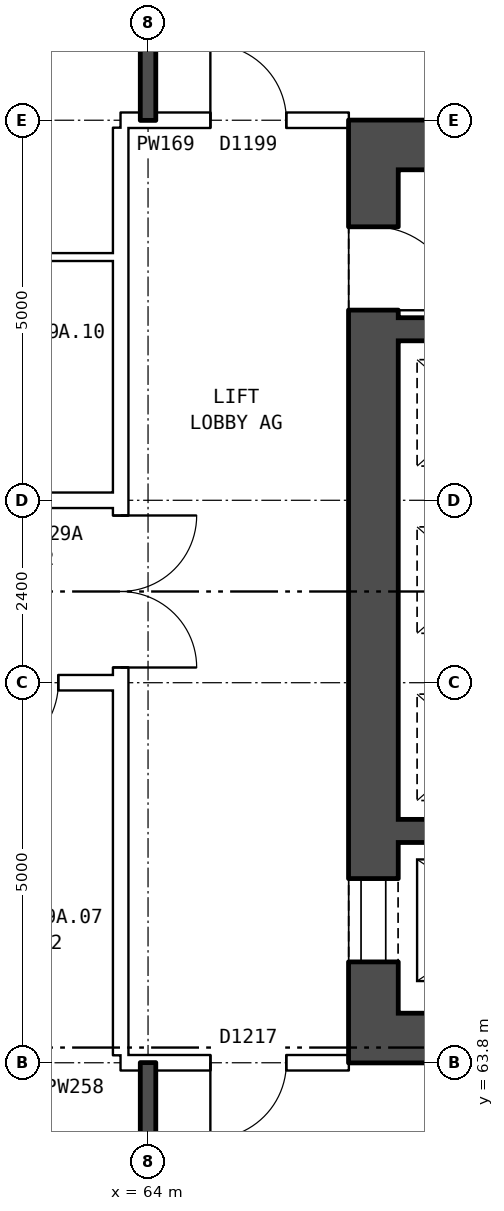
"""IFC4 building model, lengths in metres.
Left out: names, types, materials, properties, quantities, classifications, styles, units other than length and angle.
Written with IfcOpenShell. Run it as: python <this file> out.ifc"""

import sys

from ifc_helpers import new_model, si_unit, direction, frame, frame_2d, origin, place, context, subcontext, project, spatial, rectangle, extrude, element, fill, save


model = new_model("IFC4")
c1 = context("Model", 3, precision=1e-05, world=origin(), true_north=direction((0.0, 1.0)))
c2 = subcontext(c1, "Body", "Model", "MODEL_VIEW")
j1 = project(units=[si_unit("LENGTHUNIT", "METRE"), si_unit("PLANEANGLEUNIT", "RADIAN")], contexts=[c1])
p1 = place(None, origin())
s1 = spatial("IfcSite", under=j1, at=p1, CompositionType="ELEMENT")
p2 = place(p1, origin())
s2 = spatial("IfcBuilding", under=s1, at=p2, CompositionType="ELEMENT")
p3 = place(p2, frame((0.0, 0.0, 105.7)))
s3 = spatial("IfcBuildingStorey", under=s2, at=p3, CompositionType="ELEMENT", Elevation=105.7)
p4 = place(p3, frame((66.965, 64.45, 0.0), z_axis=(0.0, 0.0, 1.0), x_axis=(0.0, 1.0, 0.0)))
e1 = element("IfcWall", 1, at=p4, inside=s3, PredefinedType="SHEAR", context=c2, shape_type="SweptSolid", body=[
    extrude(rectangle(XDim=11.1, YDim=0.65, at=frame_2d((5.55, 0.0))), origin(), (0.0, 0.0, 1.0), 2.85),
])
p5 = place(p4, frame((0.675, 0.0, 0.0)))
e2 = element("IfcOpeningElement", 2, at=p5, cuts=e1, PredefinedType="OPENING", context=c2, shape_type="SweptSolid", body=[
    extrude(rectangle(XDim=1.1, YDim=2.1, at=frame_2d((0.55, 1.05))), frame((0.0, 0.335, 0.0), z_axis=(0.0, -1.0, 0.0), x_axis=(1.0, 0.0, 0.0)), (0.0, 0.0, 1.0), 0.67),
])
p6 = place(p4, frame((9.25, 0.0, 0.0)))
e3 = element("IfcOpeningElement", 3, at=p6, cuts=e1, PredefinedType="OPENING", context=c2, shape_type="SweptSolid", body=[
    extrude(rectangle(XDim=1.1, YDim=2.1, at=frame_2d((0.55, 1.05))), frame((0.0, 0.335, 0.0), z_axis=(0.0, -1.0, 0.0), x_axis=(1.0, 0.0, 0.0)), (0.0, 0.0, 1.0), 0.67),
])
for number, where, z_axis, x_axis in (
    (4, (66.64, 64.125, 0.0), (0.0, 0.0, 1.0), (1.0, 0.0, 0.0)),
    (5, (66.64, 75.875, 0.0), (0.0, 0.0, 1.0), (1.0, 0.0, 0.0)),
):
    element("IfcWall", number, at=place(p3, frame(where, z_axis=z_axis, x_axis=x_axis)), inside=s3, PredefinedType="SHEAR", context=c2, shape_type="SweptSolid", body=[
        extrude(rectangle(XDim=9.0, YDim=0.65, at=frame_2d((4.5, 0.0))), origin(), (0.0, 0.0, 1.0), 2.85),
    ])
p7 = place(p3, frame((67.29, 66.85, 0.0), z_axis=(0.0, 0.0, 1.0), x_axis=(1.0, 0.0, 0.0)))
e6 = element("IfcWall", 6, at=p7, inside=s3, PredefinedType="SHEAR", context=c2, shape_type="SweptSolid", body=[
    extrude(rectangle(XDim=3.37, YDim=0.3, at=frame_2d((1.685, 0.0))), origin(), (0.0, 0.0, 1.0), 2.85),
])
p8 = place(p3, frame((67.29, 73.45, 0.0), z_axis=(0.0, 0.0, 1.0), x_axis=(1.0, 0.0, 0.0)))
e7 = element("IfcWall", 7, at=p8, inside=s3, PredefinedType="SHEAR", context=c2, shape_type="SweptSolid", body=[
    extrude(rectangle(XDim=2.25, YDim=0.3, at=frame_2d((1.125, 0.0))), origin(), (0.0, 0.0, 1.0), 2.85),
])
p9 = place(p3, frame((63.64, 63.9, 0.0), z_axis=(0.0, 0.0, 1.0), x_axis=(0.0, 1.0, 0.0)))
e8 = element("IfcWall", 8, at=p9, inside=s3, PredefinedType="PARTITIONING", context=c2, shape_type="SweptSolid", body=[
    extrude(rectangle(XDim=12.2, YDim=0.2, at=frame_2d((6.1, 0.0))), origin(), (0.0, 0.0, 1.0), 2.85),
])
p10 = place(p9, frame((5.1, 0.0, 0.0)))
e9 = element("IfcOpeningElement", 9, at=p10, cuts=e8, PredefinedType="OPENING", context=c2, shape_type="SweptSolid", body=[
    extrude(rectangle(XDim=2.0, YDim=2.1, at=frame_2d((1.0, 1.05))), frame((0.0, 0.11, 0.0), z_axis=(0.0, -1.0, 0.0), x_axis=(1.0, 0.0, 0.0)), (0.0, 0.0, 1.0), 0.22),
])
p11 = place(p3, frame((63.64, 63.8, 0.0), z_axis=(0.0, 0.0, 1.0), x_axis=(1.0, 0.0, 0.0)))
e10 = element("IfcWall", 10, at=p11, inside=s3, PredefinedType="PARTITIONING", context=c2, shape_type="SweptSolid", body=[
    extrude(rectangle(XDim=3.0, YDim=0.2, at=frame_2d((1.5, 0.0))), origin(), (0.0, 0.0, 1.0), 2.85),
])
p12 = place(p11, frame((1.18, 0.0, 0.0)))
e11 = element("IfcOpeningElement", 11, at=p12, cuts=e10, PredefinedType="OPENING", context=c2, shape_type="SweptSolid", body=[
    extrude(rectangle(XDim=1.0, YDim=2.1, at=frame_2d((0.5, 1.05))), frame((0.0, 0.11, 0.0), z_axis=(0.0, -1.0, 0.0), x_axis=(1.0, 0.0, 0.0)), (0.0, 0.0, 1.0), 0.22),
])
p13 = place(p3, frame((44.36, 68.8, 0.0), z_axis=(0.0, 0.0, 1.0), x_axis=(1.0, 0.0, 0.0)))
e12 = element("IfcWall", 12, at=p13, inside=s3, PredefinedType="PARTITIONING", context=c2, shape_type="SweptSolid", body=[
    extrude(rectangle(XDim=19.28, YDim=0.2, at=frame_2d((9.64, 0.0))), origin(), (0.0, 0.0, 1.0), 2.85),
])
p14 = place(p13, frame((17.46, 0.0, 0.0)))
e13 = element("IfcOpeningElement", 13, at=p14, cuts=e12, PredefinedType="OPENING", context=c2, shape_type="SweptSolid", body=[
    extrude(rectangle(XDim=1.0, YDim=2.1, at=frame_2d((0.5, 1.05))), frame((0.0, 0.11, 0.0), z_axis=(0.0, -1.0, 0.0), x_axis=(1.0, 0.0, 0.0)), (0.0, 0.0, 1.0), 0.22),
])
p15 = place(p13, frame((11.64, 0.0, 0.0)))
e14 = element("IfcOpeningElement", 14, at=p15, cuts=e12, PredefinedType="OPENING", context=c2, shape_type="SweptSolid", body=[
    extrude(rectangle(XDim=1.0, YDim=2.1, at=frame_2d((0.5, 1.05))), frame((0.0, 0.11, 0.0), z_axis=(0.0, -1.0, 0.0), x_axis=(1.0, 0.0, 0.0)), (0.0, 0.0, 1.0), 0.22),
])
p16 = place(p13, frame((2.64, 0.0, 0.0)))
e15 = element("IfcOpeningElement", 15, at=p16, cuts=e12, PredefinedType="OPENING", context=c2, shape_type="SweptSolid", body=[
    extrude(rectangle(XDim=1.0, YDim=2.1, at=frame_2d((0.5, 1.05))), frame((0.0, 0.11, 0.0), z_axis=(0.0, -1.0, 0.0), x_axis=(1.0, 0.0, 0.0)), (0.0, 0.0, 1.0), 0.22),
])
p17 = place(p3, frame((44.36, 71.2, 0.0), z_axis=(0.0, 0.0, 1.0), x_axis=(1.0, 0.0, 0.0)))
e16 = element("IfcWall", 16, at=p17, inside=s3, PredefinedType="PARTITIONING", context=c2, shape_type="SweptSolid", body=[
    extrude(rectangle(XDim=19.28, YDim=0.2, at=frame_2d((9.64, 0.0))), origin(), (0.0, 0.0, 1.0), 2.85),
])
p18 = place(p17, frame((14.64, 0.0, 0.0)))
e17 = element("IfcOpeningElement", 17, at=p18, cuts=e16, PredefinedType="OPENING", context=c2, shape_type="SweptSolid", body=[
    extrude(rectangle(XDim=1.0, YDim=2.1, at=frame_2d((0.5, 1.05))), frame((0.0, 0.11, 0.0), z_axis=(0.0, -1.0, 0.0), x_axis=(1.0, 0.0, 0.0)), (0.0, 0.0, 1.0), 0.22),
])
p19 = place(p17, frame((5.64, 0.0, 0.0)))
e18 = element("IfcOpeningElement", 18, at=p19, cuts=e16, PredefinedType="OPENING", context=c2, shape_type="SweptSolid", body=[
    extrude(rectangle(XDim=1.0, YDim=2.1, at=frame_2d((0.5, 1.05))), frame((0.0, 0.11, 0.0), z_axis=(0.0, -1.0, 0.0), x_axis=(1.0, 0.0, 0.0)), (0.0, 0.0, 1.0), 0.22),
])
p20 = place(p3, frame((61.0, 74.4, 0.0), z_axis=(0.0, 0.0, 1.0), x_axis=(1.0, 0.0, 0.0)))
e19 = element("IfcWall", 19, at=p20, inside=s3, PredefinedType="PARTITIONING", context=c2, shape_type="SweptSolid", body=[
    extrude(rectangle(XDim=2.64, YDim=0.1, at=frame_2d((1.32, 0.0))), origin(), (0.0, 0.0, 1.0), 2.85),
])
p21 = place(p3, frame((63.64, 76.2, 0.0), z_axis=(0.0, 0.0, 1.0), x_axis=(1.0, 0.0, 0.0)))
e20 = element("IfcWall", 20, at=p21, inside=s3, PredefinedType="PARTITIONING", context=c2, shape_type="SweptSolid", body=[
    extrude(rectangle(XDim=3.0, YDim=0.2, at=frame_2d((1.5, 0.0))), origin(), (0.0, 0.0, 1.0), 2.85),
])
p22 = place(p21, frame((1.18, 0.0, 0.0)))
e21 = element("IfcOpeningElement", 21, at=p22, cuts=e20, PredefinedType="OPENING", context=c2, shape_type="SweptSolid", body=[
    extrude(rectangle(XDim=1.0, YDim=2.1, at=frame_2d((0.5, 1.05))), frame((0.0, 0.11, 0.0), z_axis=(0.0, -1.0, 0.0), x_axis=(1.0, 0.0, 0.0)), (0.0, 0.0, 1.0), 0.22),
])
for number, where, z_axis, x_axis in (
    (22, (64.0, 54.36, 0.0), (0.0, 0.0, 1.0), (0.0, 1.0, 0.0)),
    (23, (64.0, 76.2, 0.0), (0.0, 0.0, 1.0), (0.0, 1.0, 0.0)),
):
    element("IfcWall", number, at=place(p3, frame(where, z_axis=z_axis, x_axis=x_axis)), inside=s3, PredefinedType="SOLIDWALL", context=c2, shape_type="SweptSolid", body=[
        extrude(rectangle(XDim=9.44, YDim=0.2, at=frame_2d((4.72, 0.0))), origin(), (0.0, 0.0, 1.0), 2.85),
    ])
p23 = place(p5, origin())
e24 = element("IfcDoor", 24, at=p23, inside=s3, OperationType="DOUBLE_DOOR_SLIDING", PredefinedType="DOOR", context=c2, shape_type="SweptSolid", body=[
    extrude(rectangle(XDim=1.1, YDim=2.1, at=frame_2d((0.55, 1.05))), frame((0.0, -0.26, 0.0), z_axis=(0.0, -1.0, 0.0), x_axis=(1.0, 0.0, 0.0)), (0.0, 0.0, 1.0), 0.05),
])
fill(e2, e24)
p24 = place(p6, frame((1.1, 0.0, 0.0), z_axis=(0.0, 0.0, 1.0), x_axis=(-1.0, 0.0, 0.0)))
e25 = element("IfcDoor", 25, at=p24, inside=s3, OperationType="SINGLE_SWING_RIGHT", PredefinedType="DOOR", context=c2, shape_type="SweptSolid", body=[
    extrude(rectangle(XDim=1.1, YDim=2.1, at=frame_2d((0.55, 1.05))), frame((0.0, 0.31, 0.0), z_axis=(0.0, -1.0, 0.0), x_axis=(1.0, 0.0, 0.0)), (0.0, 0.0, 1.0), 0.05),
])
fill(e3, e25)
p25 = place(p10, frame((2.0, 0.0, 0.0), z_axis=(0.0, 0.0, 1.0), x_axis=(-1.0, 0.0, 0.0)))
e26 = element("IfcDoor", 26, at=p25, inside=s3, OperationType="DOUBLE_DOOR_SINGLE_SWING", PredefinedType="DOOR", context=c2, shape_type="SweptSolid", body=[
    extrude(rectangle(XDim=2.0, YDim=2.1, at=frame_2d((1.0, 1.05))), frame((0.0, 0.025, 0.0), z_axis=(0.0, -1.0, 0.0), x_axis=(1.0, 0.0, 0.0)), (0.0, 0.0, 1.0), 0.05),
])
fill(e9, e26)
p26 = place(p12, frame((1.0, 0.0, 0.0), z_axis=(0.0, 0.0, 1.0), x_axis=(-1.0, 0.0, 0.0)))
e27 = element("IfcDoor", 27, at=p26, inside=s3, OperationType="SINGLE_SWING_RIGHT", PredefinedType="DOOR", context=c2, shape_type="SweptSolid", body=[
    extrude(rectangle(XDim=1.0, YDim=2.1, at=frame_2d((0.5, 1.05))), frame((0.0, 0.025, 0.0), z_axis=(0.0, -1.0, 0.0), x_axis=(1.0, 0.0, 0.0)), (0.0, 0.0, 1.0), 0.05),
])
fill(e11, e27)
p27 = place(p22, origin())
e28 = element("IfcDoor", 28, at=p27, inside=s3, OperationType="SINGLE_SWING_LEFT", PredefinedType="DOOR", context=c2, shape_type="SweptSolid", body=[
    extrude(rectangle(XDim=1.0, YDim=2.1, at=frame_2d((0.5, 1.05))), frame((0.0, 0.025, 0.0), z_axis=(0.0, -1.0, 0.0), x_axis=(1.0, 0.0, 0.0)), (0.0, 0.0, 1.0), 0.05),
])
fill(e21, e28)
p28 = place(p14, frame((1.0, 0.0, 0.0), z_axis=(0.0, 0.0, 1.0), x_axis=(-1.0, 0.0, 0.0)))
e29 = element("IfcDoor", 29, at=p28, inside=s3, OperationType="SINGLE_SWING_RIGHT", PredefinedType="DOOR", context=c2, shape_type="SweptSolid", body=[
    extrude(rectangle(XDim=1.0, YDim=2.1, at=frame_2d((0.5, 1.05))), frame((0.0, 0.025, 0.0), z_axis=(0.0, -1.0, 0.0), x_axis=(1.0, 0.0, 0.0)), (0.0, 0.0, 1.0), 0.05),
])
fill(e13, e29)
save(model, sys.argv[1])
